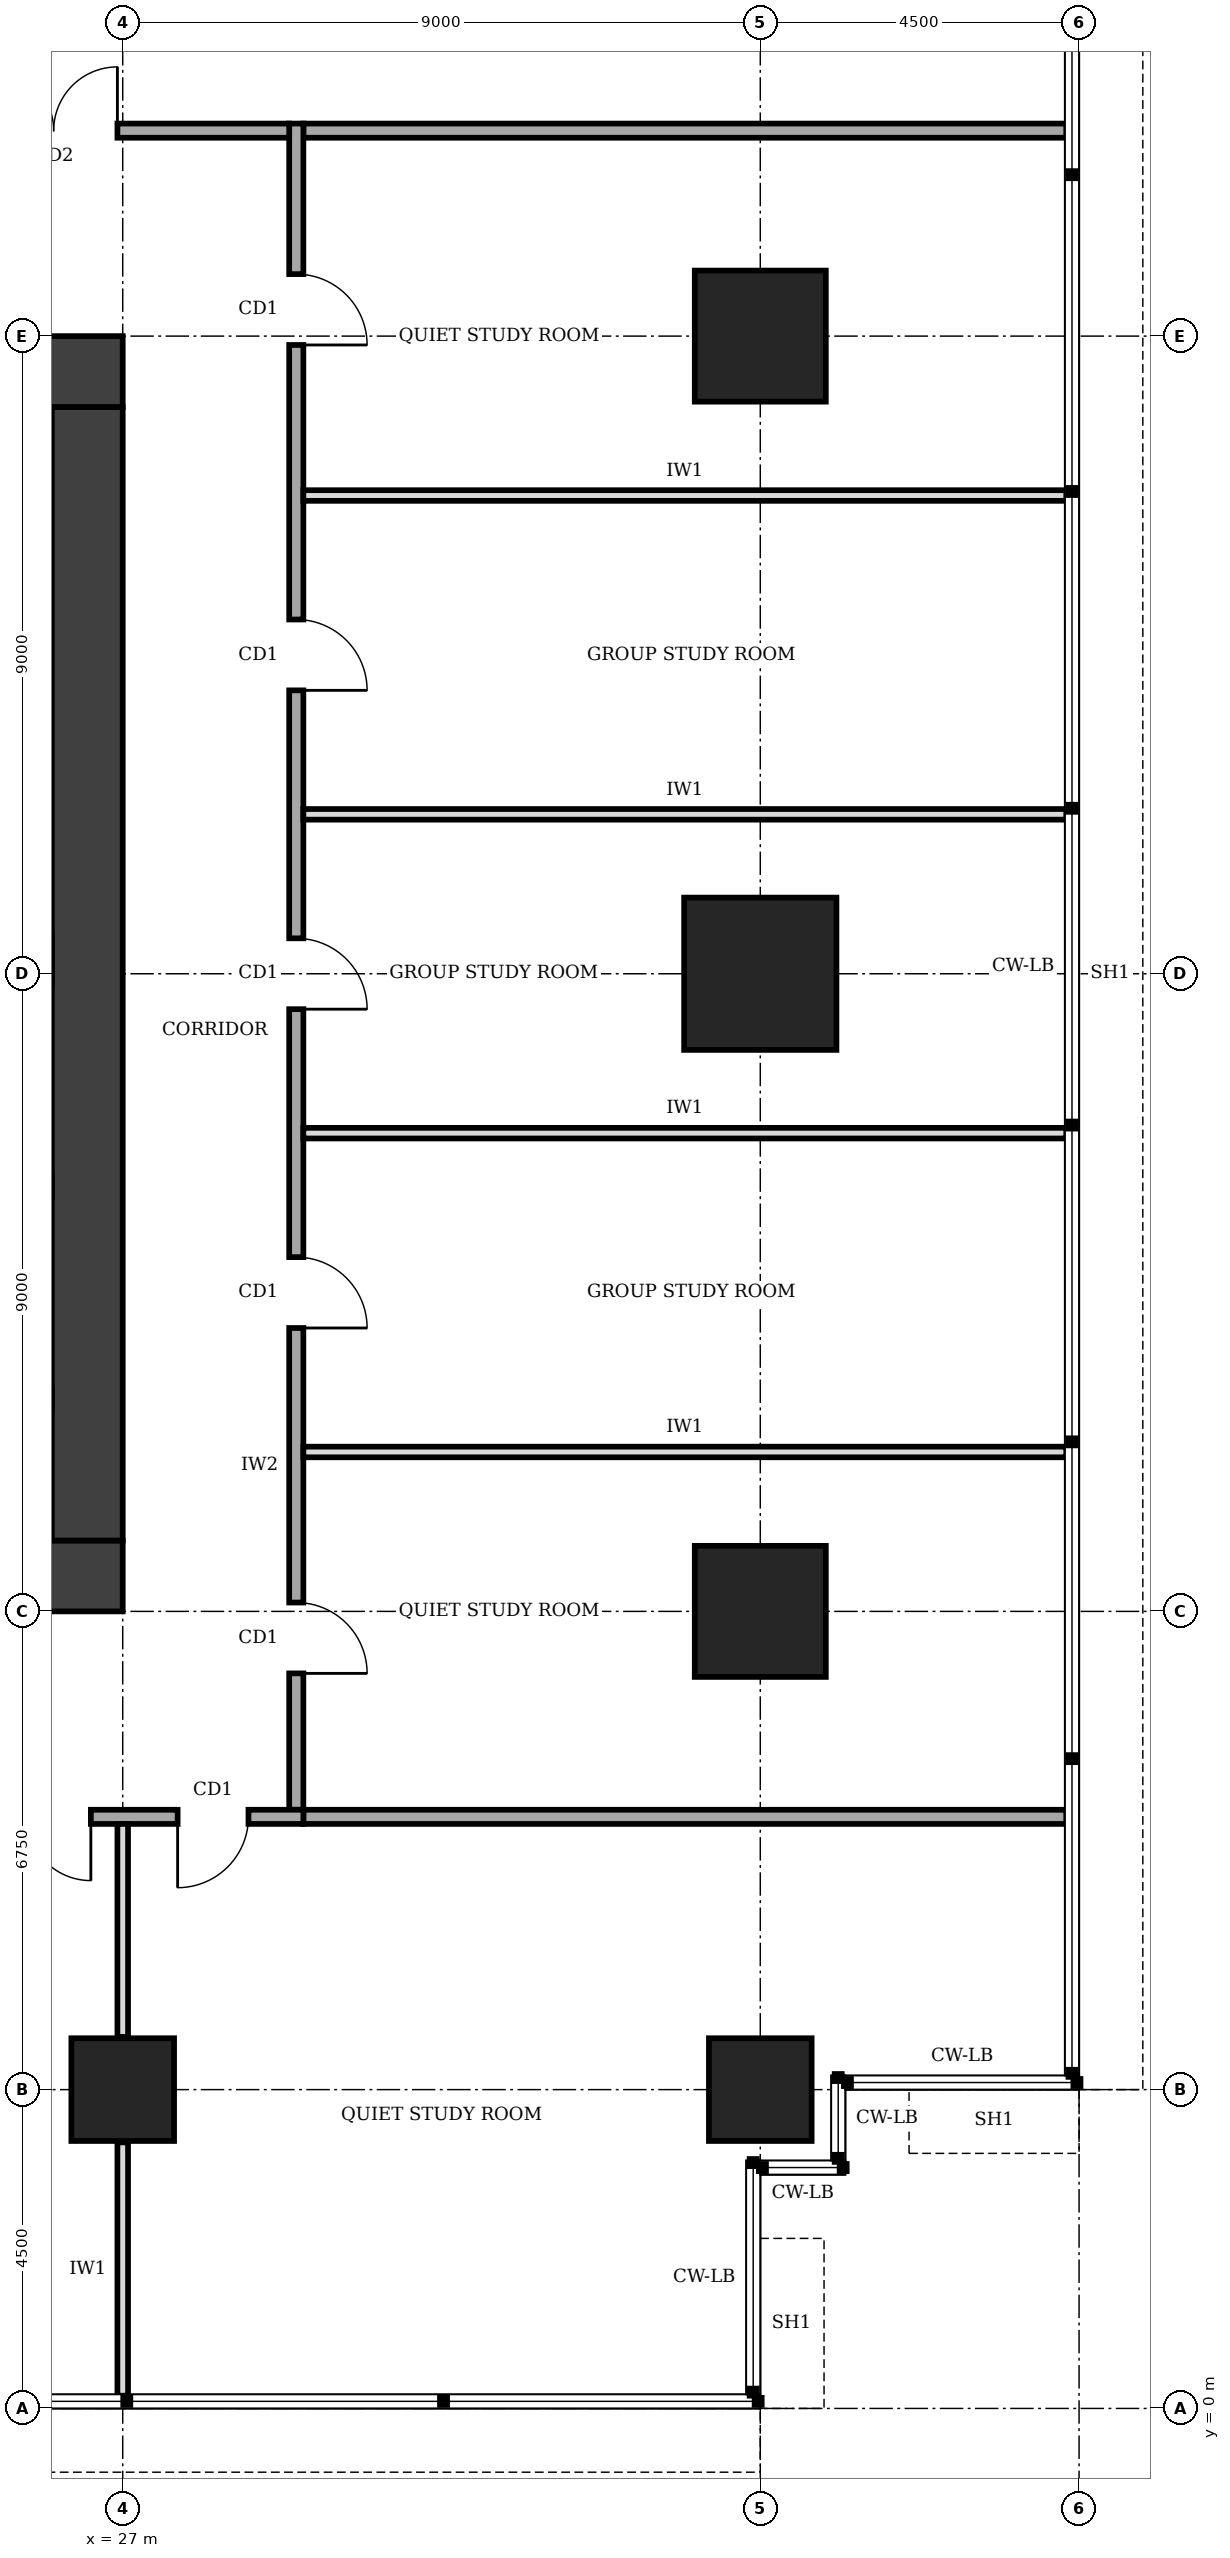
"""IFC4 building model, lengths in metres.
Left out: names, types, materials, properties, quantities, classifications, styles, units other than length and angle.
Written with IfcOpenShell. Run it as: python <this file> out.ifc"""

import sys

from ifc_helpers import new_model, si_unit, direction, frame, frame_2d, origin, origin_2d, place, context, subcontext, project, spatial, rectangle, extrude, element, fill, save


model = new_model("IFC4")
c1 = context("Model", 3, precision=1e-05, world=origin(), true_north=direction((0.0, 1.0)))
c2 = subcontext(c1, "Body", "Model", "MODEL_VIEW")
j1 = project(units=[si_unit("LENGTHUNIT", "METRE"), si_unit("PLANEANGLEUNIT", "RADIAN")], contexts=[c1])
p1 = place(None, origin())
s1 = spatial("IfcSite", under=j1, at=p1, CompositionType="ELEMENT")
p2 = place(p1, origin())
s2 = spatial("IfcBuilding", under=s1, at=p2, CompositionType="ELEMENT")
p3 = place(p2, frame((0.0, 0.0, 269.0)))
s3 = spatial("IfcBuildingStorey", under=s2, at=p3, CompositionType="ELEMENT", Elevation=269.0)
p4 = place(p3, frame((13.5, 11.75, 0.0), z_axis=(0.0, 0.0, 1.0), x_axis=(1.0, 0.0, 0.0)))
e1 = element("IfcWall", 1, at=p4, inside=s3, PredefinedType="SHEAR", context=c2, shape_type="SweptSolid", body=[
    extrude(rectangle(XDim=13.5, YDim=1.0, at=frame_2d((6.75, 0.0))), origin(), (0.0, 0.0, 1.0), 4.0),
])
p5 = place(p4, frame((4.75, 0.0, 0.0)))
e2 = element("IfcOpeningElement", 2, at=p5, cuts=e1, PredefinedType="OPENING", context=c2, shape_type="SweptSolid", body=[
    extrude(rectangle(XDim=1.0, YDim=2.1, at=frame_2d((0.5, 1.05))), frame((0.0, 0.51, 0.0), z_axis=(0.0, -1.0, 0.0), x_axis=(1.0, 0.0, 0.0)), (0.0, 0.0, 1.0), 1.02),
])
p6 = place(p3, frame((26.5, 12.25, 0.0), z_axis=(0.0, 0.0, 1.0), x_axis=(0.0, 1.0, 0.0)))
e3 = element("IfcWall", 3, at=p6, inside=s3, PredefinedType="SHEAR", context=c2, shape_type="SweptSolid", body=[
    extrude(rectangle(XDim=16.0, YDim=1.0, at=frame_2d((8.0, 0.0))), origin(), (0.0, 0.0, 1.0), 4.0),
])
p7 = place(p3, frame((27.0, 28.75, 0.0), z_axis=(0.0, 0.0, 1.0), x_axis=(-1.0, 0.0, 0.0)))
e4 = element("IfcWall", 4, at=p7, inside=s3, PredefinedType="SHEAR", context=c2, shape_type="SweptSolid", body=[
    extrude(rectangle(XDim=13.5, YDim=1.0, at=frame_2d((6.75, 0.0))), origin(), (0.0, 0.0, 1.0), 4.0),
])
p8 = place(p7, frame((4.75, 0.0, 0.0)))
e5 = element("IfcOpeningElement", 5, at=p8, cuts=e4, PredefinedType="OPENING", context=c2, shape_type="SweptSolid", body=[
    extrude(rectangle(XDim=1.8, YDim=2.1, at=frame_2d((0.9, 1.05))), frame((0.0, 0.51, 0.0), z_axis=(0.0, -1.0, 0.0), x_axis=(1.0, 0.0, 0.0)), (0.0, 0.0, 1.0), 1.02),
])
for number, where, z_axis, x_axis in (
    (6, (27.0, 4.5, 0.0), (0.0, 0.0, 1.0), (1.0, 0.0, 0.0)),
    (7, (36.0, 4.5, 0.0), (0.0, 0.0, 1.0), (1.0, 0.0, 0.0)),
):
    element("IfcColumn", number, at=place(p3, frame(where, z_axis=z_axis, x_axis=x_axis)), inside=s3, PredefinedType="COLUMN", context=c2, shape_type="SweptSolid", body=[
        extrude(rectangle(XDim=1.45, YDim=1.45, at=origin_2d()), origin(), (0.0, 0.0, 1.0), 4.0),
    ])
p9 = place(p3, frame((36.0, 11.25, 0.0), z_axis=(0.0, 0.0, 1.0), x_axis=(1.0, 0.0, 0.0)))
e8 = element("IfcColumn", 8, at=p9, inside=s3, PredefinedType="COLUMN", context=c2, shape_type="SweptSolid", body=[
    extrude(rectangle(XDim=1.85, YDim=1.85, at=origin_2d()), origin(), (0.0, 0.0, 1.0), 4.0),
])
p10 = place(p3, frame((36.0, 20.25, 0.0), z_axis=(0.0, 0.0, 1.0), x_axis=(1.0, 0.0, 0.0)))
e9 = element("IfcColumn", 9, at=p10, inside=s3, PredefinedType="COLUMN", context=c2, shape_type="SweptSolid", body=[
    extrude(rectangle(XDim=2.15, YDim=2.15, at=origin_2d()), origin(), (0.0, 0.0, 1.0), 4.0),
])
p11 = place(p3, frame((36.0, 29.25, 0.0), z_axis=(0.0, 0.0, 1.0), x_axis=(1.0, 0.0, 0.0)))
e10 = element("IfcColumn", 10, at=p11, inside=s3, PredefinedType="COLUMN", context=c2, shape_type="SweptSolid", body=[
    extrude(rectangle(XDim=1.85, YDim=1.85, at=origin_2d()), origin(), (0.0, 0.0, 1.0), 4.0),
])
p12 = place(p3, frame((11.9, 8.35, 0.0), z_axis=(0.0, 0.0, 1.0), x_axis=(1.0, 0.0, 0.0)))
e11 = element("IfcWall", 11, at=p12, inside=s3, PredefinedType="SOLIDWALL", context=c2, shape_type="SweptSolid", body=[
    extrude(rectangle(XDim=17.65, YDim=0.2, at=frame_2d((8.825, 0.0))), origin(), (0.0, 0.0, 1.0), 3.75),
])
p13 = place(p12, frame((2.05, 0.0, 0.0)))
e12 = element("IfcOpeningElement", 12, at=p13, cuts=e11, PredefinedType="OPENING", context=c2, shape_type="SweptSolid", body=[
    extrude(rectangle(XDim=1.8, YDim=2.1, at=frame_2d((0.9, 1.05))), frame((0.0, 0.11, 0.0), z_axis=(0.0, -1.0, 0.0), x_axis=(1.0, 0.0, 0.0)), (0.0, 0.0, 1.0), 0.22),
])
p14 = place(p12, frame((6.55, 0.0, 0.0)))
e13 = element("IfcOpeningElement", 13, at=p14, cuts=e11, PredefinedType="OPENING", context=c2, shape_type="SweptSolid", body=[
    extrude(rectangle(XDim=1.8, YDim=2.1, at=frame_2d((0.9, 1.05))), frame((0.0, 0.11, 0.0), z_axis=(0.0, -1.0, 0.0), x_axis=(1.0, 0.0, 0.0)), (0.0, 0.0, 1.0), 0.22),
])
p15 = place(p12, frame((12.85, 0.0, 0.0)))
e14 = element("IfcOpeningElement", 14, at=p15, cuts=e11, PredefinedType="OPENING", context=c2, shape_type="SweptSolid", body=[
    extrude(rectangle(XDim=1.8, YDim=2.1, at=frame_2d((0.9, 1.05))), frame((0.0, 0.11, 0.0), z_axis=(0.0, -1.0, 0.0), x_axis=(1.0, 0.0, 0.0)), (0.0, 0.0, 1.0), 0.22),
])
p16 = place(p12, frame((15.875, 0.0, 0.0)))
e15 = element("IfcOpeningElement", 15, at=p16, cuts=e11, PredefinedType="OPENING", context=c2, shape_type="SweptSolid", body=[
    extrude(rectangle(XDim=1.0, YDim=2.1, at=frame_2d((0.5, 1.05))), frame((0.0, 0.11, 0.0), z_axis=(0.0, -1.0, 0.0), x_axis=(1.0, 0.0, 0.0)), (0.0, 0.0, 1.0), 0.22),
])
p17 = place(p3, frame((29.45, 8.45, 0.0), z_axis=(0.0, 0.0, 1.0), x_axis=(0.0, 1.0, 0.0)))
e16 = element("IfcWall", 16, at=p17, inside=s3, PredefinedType="SOLIDWALL", context=c2, shape_type="SweptSolid", body=[
    extrude(rectangle(XDim=23.8, YDim=0.2, at=frame_2d((11.9, 0.0))), origin(), (0.0, 0.0, 1.0), 3.75),
])
p18 = place(p17, frame((1.925, 0.0, 0.0)))
e17 = element("IfcOpeningElement", 17, at=p18, cuts=e16, PredefinedType="OPENING", context=c2, shape_type="SweptSolid", body=[
    extrude(rectangle(XDim=1.0, YDim=2.1, at=frame_2d((0.5, 1.05))), frame((0.0, 0.11, 0.0), z_axis=(0.0, -1.0, 0.0), x_axis=(1.0, 0.0, 0.0)), (0.0, 0.0, 1.0), 0.22),
])
p19 = place(p17, frame((6.8, 0.0, 0.0)))
e18 = element("IfcOpeningElement", 18, at=p19, cuts=e16, PredefinedType="OPENING", context=c2, shape_type="SweptSolid", body=[
    extrude(rectangle(XDim=1.0, YDim=2.1, at=frame_2d((0.5, 1.05))), frame((0.0, 0.11, 0.0), z_axis=(0.0, -1.0, 0.0), x_axis=(1.0, 0.0, 0.0)), (0.0, 0.0, 1.0), 0.22),
])
p20 = place(p17, frame((11.3, 0.0, 0.0)))
e19 = element("IfcOpeningElement", 19, at=p20, cuts=e16, PredefinedType="OPENING", context=c2, shape_type="SweptSolid", body=[
    extrude(rectangle(XDim=1.0, YDim=2.1, at=frame_2d((0.5, 1.05))), frame((0.0, 0.11, 0.0), z_axis=(0.0, -1.0, 0.0), x_axis=(1.0, 0.0, 0.0)), (0.0, 0.0, 1.0), 0.22),
])
p21 = place(p17, frame((15.8, 0.0, 0.0)))
e20 = element("IfcOpeningElement", 20, at=p21, cuts=e16, PredefinedType="OPENING", context=c2, shape_type="SweptSolid", body=[
    extrude(rectangle(XDim=1.0, YDim=2.1, at=frame_2d((0.5, 1.05))), frame((0.0, 0.11, 0.0), z_axis=(0.0, -1.0, 0.0), x_axis=(1.0, 0.0, 0.0)), (0.0, 0.0, 1.0), 0.22),
])
p22 = place(p17, frame((20.675, 0.0, 0.0)))
e21 = element("IfcOpeningElement", 21, at=p22, cuts=e16, PredefinedType="OPENING", context=c2, shape_type="SweptSolid", body=[
    extrude(rectangle(XDim=1.0, YDim=2.1, at=frame_2d((0.5, 1.05))), frame((0.0, 0.11, 0.0), z_axis=(0.0, -1.0, 0.0), x_axis=(1.0, 0.0, 0.0)), (0.0, 0.0, 1.0), 0.22),
])
p23 = place(p3, frame((29.35, 32.15, 0.0), z_axis=(0.0, 0.0, 1.0), x_axis=(-1.0, 0.0, 0.0)))
e22 = element("IfcWall", 22, at=p23, inside=s3, PredefinedType="SOLIDWALL", context=c2, shape_type="SweptSolid", body=[
    extrude(rectangle(XDim=17.65, YDim=0.2, at=frame_2d((8.825, 0.0))), origin(), (0.0, 0.0, 1.0), 3.75),
])
p24 = place(p23, frame((16.175, 0.0, 0.0)))
e23 = element("IfcOpeningElement", 23, at=p24, cuts=e22, PredefinedType="OPENING", context=c2, shape_type="SweptSolid", body=[
    extrude(rectangle(XDim=1.0, YDim=2.1, at=frame_2d((0.5, 1.05))), frame((0.0, 0.11, 0.0), z_axis=(0.0, -1.0, 0.0), x_axis=(1.0, 0.0, 0.0)), (0.0, 0.0, 1.0), 0.22),
])
p25 = place(p23, frame((10.85, 0.0, 0.0)))
e24 = element("IfcOpeningElement", 24, at=p25, cuts=e22, PredefinedType="OPENING", context=c2, shape_type="SweptSolid", body=[
    extrude(rectangle(XDim=1.0, YDim=2.1, at=frame_2d((0.5, 1.05))), frame((0.0, 0.11, 0.0), z_axis=(0.0, -1.0, 0.0), x_axis=(1.0, 0.0, 0.0)), (0.0, 0.0, 1.0), 0.22),
])
p26 = place(p23, frame((2.425, 0.0, 0.0)))
e25 = element("IfcOpeningElement", 25, at=p26, cuts=e22, PredefinedType="OPENING", context=c2, shape_type="SweptSolid", body=[
    extrude(rectangle(XDim=1.8, YDim=2.1, at=frame_2d((0.9, 1.05))), frame((0.0, 0.11, 0.0), z_axis=(0.0, -1.0, 0.0), x_axis=(1.0, 0.0, 0.0)), (0.0, 0.0, 1.0), 0.22),
])
for number, where, z_axis, x_axis in (
    (26, (29.55, 8.35, 0.0), (0.0, 0.0, 1.0), (1.0, 0.0, 0.0)),
    (27, (29.55, 32.15, 0.0), (0.0, 0.0, 1.0), (1.0, 0.0, 0.0)),
):
    element("IfcWall", number, at=place(p3, frame(where, z_axis=z_axis, x_axis=x_axis)), inside=s3, PredefinedType="SOLIDWALL", context=c2, shape_type="SweptSolid", body=[
        extrude(rectangle(XDim=10.77, YDim=0.2, at=frame_2d((5.385, 0.0))), origin(), (0.0, 0.0, 1.0), 3.75),
    ])
p27 = place(p3, frame((27.0, 0.18, 0.0), z_axis=(0.0, 0.0, 1.0), x_axis=(0.0, 1.0, 0.0)))
e28 = element("IfcWall", 28, at=p27, inside=s3, PredefinedType="PARTITIONING", context=c2, shape_type="SweptSolid", body=[
    extrude(rectangle(XDim=3.575, YDim=0.15, at=frame_2d((1.788, 0.0))), origin(), (0.0, 0.0, 1.0), 2.85),
])
p28 = place(p3, frame((27.0, 5.245, 0.0), z_axis=(0.0, 0.0, 1.0), x_axis=(0.0, 1.0, 0.0)))
e29 = element("IfcWall", 29, at=p28, inside=s3, PredefinedType="PARTITIONING", context=c2, shape_type="SweptSolid", body=[
    extrude(rectangle(XDim=3.005, YDim=0.15, at=frame_2d((1.502, 0.0))), origin(), (0.0, 0.0, 1.0), 2.85),
])
for number, where, z_axis, x_axis in (
    (30, (29.55, 13.5, 0.0), (0.0, 0.0, 1.0), (1.0, 0.0, 0.0)),
    (31, (29.55, 18.0, 0.0), (0.0, 0.0, 1.0), (1.0, 0.0, 0.0)),
    (32, (29.55, 22.5, 0.0), (0.0, 0.0, 1.0), (1.0, 0.0, 0.0)),
    (33, (29.55, 27.0, 0.0), (0.0, 0.0, 1.0), (1.0, 0.0, 0.0)),
):
    element("IfcWall", number, at=place(p3, frame(where, z_axis=z_axis, x_axis=x_axis)), inside=s3, PredefinedType="PARTITIONING", context=c2, shape_type="SweptSolid", body=[
        extrude(rectangle(XDim=10.77, YDim=0.15, at=frame_2d((5.385, 0.0))), origin(), (0.0, 0.0, 1.0), 3.75),
    ])
p29 = place(p15, frame((1.8, 0.0, 0.0), z_axis=(0.0, 0.0, 1.0), x_axis=(-1.0, 0.0, 0.0)))
e34 = element("IfcDoor", 34, at=p29, inside=s3, OperationType="DOUBLE_DOOR_SINGLE_SWING", PredefinedType="DOOR", context=c2, shape_type="SweptSolid", body=[
    extrude(rectangle(XDim=1.8, YDim=2.1, at=frame_2d((0.9, 1.05))), frame((0.0, 0.025, 0.0), z_axis=(0.0, -1.0, 0.0), x_axis=(1.0, 0.0, 0.0)), (0.0, 0.0, 1.0), 0.05),
])
fill(e14, e34)
p30 = place(p16, frame((1.0, 0.0, 0.0), z_axis=(0.0, 0.0, 1.0), x_axis=(-1.0, 0.0, 0.0)))
e35 = element("IfcDoor", 35, at=p30, inside=s3, OperationType="SINGLE_SWING_RIGHT", PredefinedType="DOOR", context=c2, shape_type="SweptSolid", body=[
    extrude(rectangle(XDim=1.0, YDim=2.1, at=frame_2d((0.5, 1.05))), frame((0.0, 0.025, 0.0), z_axis=(0.0, -1.0, 0.0), x_axis=(1.0, 0.0, 0.0)), (0.0, 0.0, 1.0), 0.05),
])
fill(e15, e35)
p31 = place(p18, frame((1.0, 0.0, 0.0), z_axis=(0.0, 0.0, 1.0), x_axis=(-1.0, 0.0, 0.0)))
e36 = element("IfcDoor", 36, at=p31, inside=s3, OperationType="SINGLE_SWING_RIGHT", PredefinedType="DOOR", context=c2, shape_type="SweptSolid", body=[
    extrude(rectangle(XDim=1.0, YDim=2.1, at=frame_2d((0.5, 1.05))), frame((0.0, 0.025, 0.0), z_axis=(0.0, -1.0, 0.0), x_axis=(1.0, 0.0, 0.0)), (0.0, 0.0, 1.0), 0.05),
])
fill(e17, e36)
p32 = place(p19, frame((1.0, 0.0, 0.0), z_axis=(0.0, 0.0, 1.0), x_axis=(-1.0, 0.0, 0.0)))
e37 = element("IfcDoor", 37, at=p32, inside=s3, OperationType="SINGLE_SWING_RIGHT", PredefinedType="DOOR", context=c2, shape_type="SweptSolid", body=[
    extrude(rectangle(XDim=1.0, YDim=2.1, at=frame_2d((0.5, 1.05))), frame((0.0, 0.025, 0.0), z_axis=(0.0, -1.0, 0.0), x_axis=(1.0, 0.0, 0.0)), (0.0, 0.0, 1.0), 0.05),
])
fill(e18, e37)
p33 = place(p20, frame((1.0, 0.0, 0.0), z_axis=(0.0, 0.0, 1.0), x_axis=(-1.0, 0.0, 0.0)))
e38 = element("IfcDoor", 38, at=p33, inside=s3, OperationType="SINGLE_SWING_RIGHT", PredefinedType="DOOR", context=c2, shape_type="SweptSolid", body=[
    extrude(rectangle(XDim=1.0, YDim=2.1, at=frame_2d((0.5, 1.05))), frame((0.0, 0.025, 0.0), z_axis=(0.0, -1.0, 0.0), x_axis=(1.0, 0.0, 0.0)), (0.0, 0.0, 1.0), 0.05),
])
fill(e19, e38)
p34 = place(p21, frame((1.0, 0.0, 0.0), z_axis=(0.0, 0.0, 1.0), x_axis=(-1.0, 0.0, 0.0)))
e39 = element("IfcDoor", 39, at=p34, inside=s3, OperationType="SINGLE_SWING_RIGHT", PredefinedType="DOOR", context=c2, shape_type="SweptSolid", body=[
    extrude(rectangle(XDim=1.0, YDim=2.1, at=frame_2d((0.5, 1.05))), frame((0.0, 0.025, 0.0), z_axis=(0.0, -1.0, 0.0), x_axis=(1.0, 0.0, 0.0)), (0.0, 0.0, 1.0), 0.05),
])
fill(e20, e39)
p35 = place(p22, frame((1.0, 0.0, 0.0), z_axis=(0.0, 0.0, 1.0), x_axis=(-1.0, 0.0, 0.0)))
e40 = element("IfcDoor", 40, at=p35, inside=s3, OperationType="SINGLE_SWING_RIGHT", PredefinedType="DOOR", context=c2, shape_type="SweptSolid", body=[
    extrude(rectangle(XDim=1.0, YDim=2.1, at=frame_2d((0.5, 1.05))), frame((0.0, 0.025, 0.0), z_axis=(0.0, -1.0, 0.0), x_axis=(1.0, 0.0, 0.0)), (0.0, 0.0, 1.0), 0.05),
])
fill(e21, e40)
p36 = place(p26, frame((1.8, 0.0, 0.0), z_axis=(0.0, 0.0, 1.0), x_axis=(-1.0, 0.0, 0.0)))
e41 = element("IfcDoor", 41, at=p36, inside=s3, OperationType="DOUBLE_DOOR_SINGLE_SWING", PredefinedType="DOOR", context=c2, shape_type="SweptSolid", body=[
    extrude(rectangle(XDim=1.8, YDim=2.1, at=frame_2d((0.9, 1.05))), frame((0.0, 0.025, 0.0), z_axis=(0.0, -1.0, 0.0), x_axis=(1.0, 0.0, 0.0)), (0.0, 0.0, 1.0), 0.05),
])
fill(e25, e41)
save(model, sys.argv[1])
